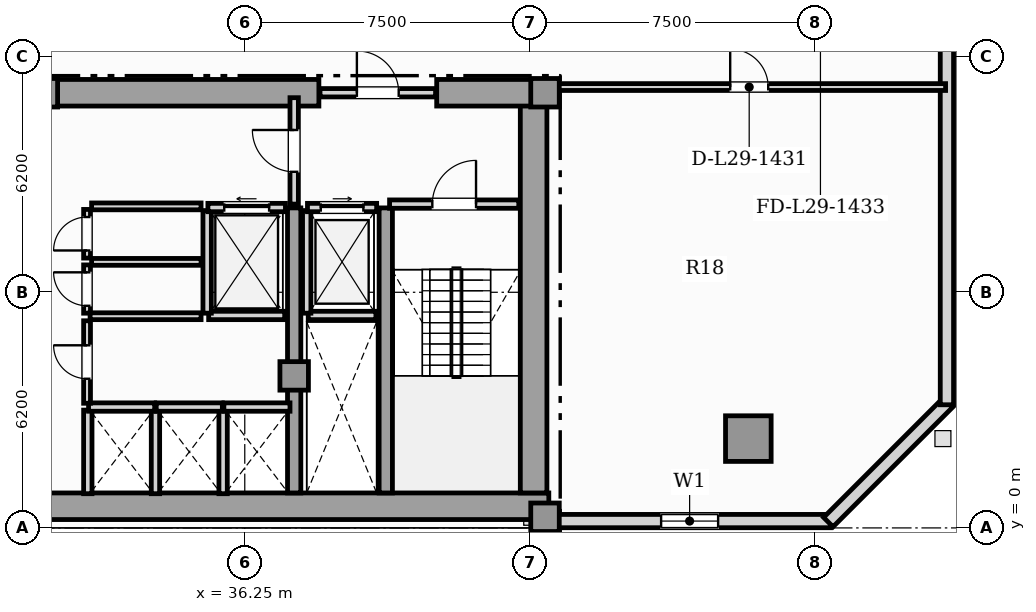
"""IFC4 building model, lengths in metres.
Left out: names, types, materials, properties, quantities, classifications, styles, units other than length and angle.
Written with IfcOpenShell. Run it as: python <this file> out.ifc"""

import sys

from ifc_helpers import new_model, si_unit, direction, frame, frame_2d, origin, origin_2d, place, context, subcontext, project, spatial, rectangle, hollow_rectangle, extrude, element, fill, save


model = new_model("IFC4")
c1 = context("Model", 3, precision=1e-05, world=origin(), true_north=direction((0.0, 1.0)))
c2 = subcontext(c1, "Body", "Model", "MODEL_VIEW")
j1 = project(units=[si_unit("LENGTHUNIT", "METRE"), si_unit("PLANEANGLEUNIT", "RADIAN")], contexts=[c1])
p1 = place(None, origin())
s1 = spatial("IfcSite", under=j1, at=p1, CompositionType="ELEMENT")
p2 = place(p1, origin())
s2 = spatial("IfcBuilding", under=s1, at=p2, CompositionType="ELEMENT")
p3 = place(p2, frame((0.0, 0.0, 119.55)))
s3 = spatial("IfcBuildingStorey", under=s2, at=p3, CompositionType="ELEMENT", Elevation=119.55)
p4 = place(p3, frame((13.25, 0.57, 0.0), z_axis=(0.0, 0.0, 1.0), x_axis=(1.0, 0.0, 0.0)))
e1 = element("IfcWall", 1, at=p4, inside=s3, PredefinedType="SHEAR", context=c2, shape_type="SweptSolid", body=[
    extrude(rectangle(XDim=31.0, YDim=0.7, at=frame_2d((15.5, 0.0))), origin(), (0.0, 0.0, 1.0), 3.6),
])
p5 = place(p3, frame((43.85, 0.92, 0.0), z_axis=(0.0, 0.0, 1.0), x_axis=(0.0, 1.0, 0.0)))
e2 = element("IfcWall", 2, at=p5, inside=s3, PredefinedType="SHEAR", context=c2, shape_type="SweptSolid", body=[
    extrude(rectangle(XDim=10.53, YDim=0.7, at=frame_2d((5.265, 0.0))), origin(), (0.0, 0.0, 1.0), 3.6),
])
p6 = place(p3, frame((30.9, 11.45, 0.0), z_axis=(0.0, 0.0, 1.0), x_axis=(1.0, 0.0, 0.0)))
e3 = element("IfcWall", 3, at=p6, inside=s3, PredefinedType="SHEAR", context=c2, shape_type="SweptSolid", body=[
    extrude(rectangle(XDim=7.3, YDim=0.7, at=frame_2d((3.65, 0.0))), origin(), (0.0, 0.0, 1.0), 3.6),
])
p7 = place(p3, frame((41.3, 11.45, 0.0), z_axis=(0.0, 0.0, 1.0), x_axis=(1.0, 0.0, 0.0)))
e4 = element("IfcWall", 4, at=p7, inside=s3, PredefinedType="SHEAR", context=c2, shape_type="SweptSolid", body=[
    extrude(rectangle(XDim=2.95, YDim=0.7, at=frame_2d((1.475, 0.0))), origin(), (0.0, 0.0, 1.0), 3.6),
])
for number, where, z_axis, x_axis in (
    (5, (37.55, 0.92, 0.0), (0.0, 0.0, 1.0), (0.0, 1.0, 0.0)),
    (6, (39.96, 0.92, 0.0), (0.0, 0.0, 1.0), (0.0, 1.0, 0.0)),
):
    element("IfcWall", number, at=place(p3, frame(where, z_axis=z_axis, x_axis=x_axis)), inside=s3, PredefinedType="SHEAR", context=c2, shape_type="SweptSolid", body=[
        extrude(rectangle(XDim=7.5, YDim=0.35, at=frame_2d((3.75, 0.0))), origin(), (0.0, 0.0, 1.0), 3.6),
    ])
for number, where, z_axis, x_axis in (
    (7, (44.15, 0.28, 0.0), (0.0, 0.0, 1.0), (1.0, 0.0, 0.0)),
    (8, (44.15, 11.45, 0.0), (0.0, 0.0, 1.0), (1.0, 0.0, 0.0)),
    (9, (37.55, 4.0, 0.0), (0.0, 0.0, 1.0), (1.0, 0.0, 0.0)),
    (10, (30.95, 11.45, 0.0), (0.0, 0.0, 1.0), (1.0, 0.0, 0.0)),
):
    element("IfcColumn", number, at=place(p3, frame(where, z_axis=z_axis, x_axis=x_axis)), inside=s3, PredefinedType="COLUMN", context=c2, shape_type="SweptSolid", body=[
        extrude(rectangle(XDim=0.75, YDim=0.75, at=origin_2d()), origin(), (0.0, 0.0, 1.0), 3.85),
    ])
p8 = place(p3, frame((49.5, 2.35, 0.0), z_axis=(0.0, 0.0, 1.0), x_axis=(1.0, 0.0, 0.0)))
e11 = element("IfcColumn", 11, at=p8, inside=s3, PredefinedType="USERDEFINED", context=c2, shape_type="SweptSolid", body=[
    extrude(hollow_rectangle(XDim=1.2, YDim=1.2, WallThickness=0.07, at=origin_2d()), origin(), (0.0, 0.0, 1.0), 3.85),
])
p9 = place(p3, frame((44.25, 0.18, 0.0), z_axis=(0.0, 0.0, 1.0), x_axis=(1.0, 0.0, 0.0)))
e12 = element("IfcWall", 12, at=p9, inside=s3, PredefinedType="SOLIDWALL", context=c2, shape_type="SweptSolid", body=[
    extrude(rectangle(XDim=7.41, YDim=0.35, at=frame_2d((3.705, 0.0))), origin(), (0.0, 0.0, 1.0), 3.6),
])
p10 = place(p9, frame((2.955, 0.0, 0.9)))
e13 = element("IfcOpeningElement", 13, at=p10, cuts=e12, PredefinedType="OPENING", context=c2, shape_type="SweptSolid", body=[
    extrude(rectangle(XDim=1.5, YDim=1.95, at=frame_2d((0.75, 0.975))), frame((0.0, 0.185, 0.0), z_axis=(0.0, -1.0, 0.0), x_axis=(1.0, 0.0, 0.0)), (0.0, 0.0, 1.0), 0.37),
])
p11 = place(p3, frame((51.604, 0.152, 0.0), z_axis=(0.0, 0.0, 1.0), x_axis=(0.707134240044, 0.707079321262, 0.0)))
e14 = element("IfcWall", 14, at=p11, inside=s3, PredefinedType="SOLIDWALL", context=c2, shape_type="SweptSolid", body=[
    extrude(rectangle(XDim=4.446, YDim=0.35, at=frame_2d((2.223, 0.0))), origin(), (0.0, 0.0, 1.0), 3.6),
])
p12 = place(p3, frame((54.725, 3.24, 0.0), z_axis=(0.0, 0.0, 1.0), x_axis=(0.0, 1.0, 0.0)))
e15 = element("IfcWall", 15, at=p12, inside=s3, PredefinedType="SOLIDWALL", context=c2, shape_type="SweptSolid", body=[
    extrude(rectangle(XDim=18.37, YDim=0.35, at=frame_2d((9.185, 0.0))), origin(), (0.0, 0.0, 1.0), 3.6),
])
p13 = place(p12, frame((12.762, 0.0, 0.9)))
e16 = element("IfcOpeningElement", 16, at=p13, cuts=e15, PredefinedType="OPENING", context=c2, shape_type="SweptSolid", body=[
    extrude(rectangle(XDim=1.5, YDim=1.95, at=frame_2d((0.75, 0.975))), frame((0.0, 0.185, 0.0), z_axis=(0.0, -1.0, 0.0), x_axis=(1.0, 0.0, 0.0)), (0.0, 0.0, 1.0), 0.37),
])
p14 = place(p3, frame((37.92, 5.59, 0.0), z_axis=(0.0, 0.0, 1.0), x_axis=(1.0, 0.0, 0.0)))
e17 = element("IfcWall", 17, at=p14, inside=s3, PredefinedType="SOLIDWALL", context=c2, shape_type="SweptSolid", body=[
    extrude(rectangle(XDim=1.78, YDim=0.22, at=frame_2d((0.89, 0.0))), origin(), (0.0, 0.0, 1.0), 3.6),
])
p15 = place(p3, frame((37.88, 5.65, 0.0), z_axis=(0.0, 0.0, 1.0), x_axis=(0.0, 1.0, 0.0)))
e18 = element("IfcWall", 18, at=p15, inside=s3, PredefinedType="SOLIDWALL", context=c2, shape_type="SweptSolid", body=[
    extrude(rectangle(XDim=2.7, YDim=0.22, at=frame_2d((1.35, 0.0))), origin(), (0.0, 0.0, 1.0), 3.6),
])
p16 = place(p3, frame((37.9, 8.43, 0.0), z_axis=(0.0, 0.0, 1.0), x_axis=(1.0, 0.0, 0.0)))
e19 = element("IfcWall", 19, at=p16, inside=s3, PredefinedType="SOLIDWALL", context=c2, shape_type="SweptSolid", body=[
    extrude(rectangle(XDim=1.82, YDim=0.22, at=frame_2d((0.91, 0.0))), origin(), (0.0, 0.0, 1.0), 3.6),
])
p17 = place(p16, frame((0.35, 0.0, 0.0)))
e20 = element("IfcOpeningElement", 20, at=p17, cuts=e19, PredefinedType="OPENING", context=c2, shape_type="SweptSolid", body=[
    extrude(rectangle(XDim=1.12, YDim=2.25, at=frame_2d((0.56, 1.125))), frame((0.0, 0.12, 0.0), z_axis=(0.0, -1.0, 0.0), x_axis=(1.0, 0.0, 0.0)), (0.0, 0.0, 1.0), 0.24),
])
p18 = place(p3, frame((35.3, 5.59, 0.0), z_axis=(0.0, 0.0, 1.0), x_axis=(1.0, 0.0, 0.0)))
e21 = element("IfcWall", 21, at=p18, inside=s3, PredefinedType="SOLIDWALL", context=c2, shape_type="SweptSolid", body=[
    extrude(rectangle(XDim=2.0, YDim=0.22, at=frame_2d((1.0, 0.0))), origin(), (0.0, 0.0, 1.0), 3.6),
])
p19 = place(p3, frame((35.26, 5.65, 0.0), z_axis=(0.0, 0.0, 1.0), x_axis=(0.0, 1.0, 0.0)))
e22 = element("IfcWall", 22, at=p19, inside=s3, PredefinedType="SOLIDWALL", context=c2, shape_type="SweptSolid", body=[
    extrude(rectangle(XDim=2.7, YDim=0.22, at=frame_2d((1.35, 0.0))), origin(), (0.0, 0.0, 1.0), 3.6),
])
p20 = place(p3, frame((35.28, 8.43, 0.0), z_axis=(0.0, 0.0, 1.0), x_axis=(1.0, 0.0, 0.0)))
e23 = element("IfcWall", 23, at=p20, inside=s3, PredefinedType="SOLIDWALL", context=c2, shape_type="SweptSolid", body=[
    extrude(rectangle(XDim=2.04, YDim=0.22, at=frame_2d((1.02, 0.0))), origin(), (0.0, 0.0, 1.0), 3.6),
])
p21 = place(p20, frame((0.43, 0.0, 0.0)))
e24 = element("IfcOpeningElement", 24, at=p21, cuts=e23, PredefinedType="OPENING", context=c2, shape_type="SweptSolid", body=[
    extrude(rectangle(XDim=1.18, YDim=2.2, at=frame_2d((0.59, 1.1))), frame((0.0, 0.12, 0.0), z_axis=(0.0, -1.0, 0.0), x_axis=(1.0, 0.0, 0.0)), (0.0, 0.0, 1.0), 0.24),
])
for number, where, z_axis, x_axis in (
    (25, (32.12, 0.9, 0.0), (0.0, 0.0, 1.0), (0.0, 1.0, 0.0)),
    (26, (33.9, 0.9, 0.0), (0.0, 0.0, 1.0), (0.0, 1.0, 0.0)),
):
    element("IfcWall", number, at=place(p3, frame(where, z_axis=z_axis, x_axis=x_axis)), inside=s3, PredefinedType="SOLIDWALL", context=c2, shape_type="SweptSolid", body=[
        extrude(rectangle(XDim=2.2, YDim=0.22, at=frame_2d((1.1, 0.0))), origin(), (0.0, 0.0, 1.0), 3.6),
    ])
p22 = place(p3, frame((32.14, 3.18, 0.0), z_axis=(0.0, 0.0, 1.0), x_axis=(1.0, 0.0, 0.0)))
e27 = element("IfcWall", 27, at=p22, inside=s3, PredefinedType="SOLIDWALL", context=c2, shape_type="SweptSolid", body=[
    extrude(rectangle(XDim=1.74, YDim=0.22, at=frame_2d((0.87, 0.0))), origin(), (0.0, 0.0, 1.0), 3.6),
])
p23 = place(p3, frame((35.68, 0.9, 0.0), z_axis=(0.0, 0.0, 1.0), x_axis=(0.0, 1.0, 0.0)))
e28 = element("IfcWall", 28, at=p23, inside=s3, PredefinedType="SOLIDWALL", context=c2, shape_type="SweptSolid", body=[
    extrude(rectangle(XDim=2.2, YDim=0.22, at=frame_2d((1.1, 0.0))), origin(), (0.0, 0.0, 1.0), 3.6),
])
for number, where, z_axis, x_axis in (
    (29, (33.92, 3.18, 0.0), (0.0, 0.0, 1.0), (1.0, 0.0, 0.0)),
    (30, (35.7, 3.18, 0.0), (0.0, 0.0, 1.0), (1.0, 0.0, 0.0)),
):
    element("IfcWall", number, at=place(p3, frame(where, z_axis=z_axis, x_axis=x_axis)), inside=s3, PredefinedType="SOLIDWALL", context=c2, shape_type="SweptSolid", body=[
        extrude(rectangle(XDim=1.74, YDim=0.22, at=frame_2d((0.87, 0.0))), origin(), (0.0, 0.0, 1.0), 3.6),
    ])
p24 = place(p3, frame((40.06, 8.52, 0.0), z_axis=(0.0, 0.0, 1.0), x_axis=(1.0, 0.0, 0.0)))
e31 = element("IfcWall", 31, at=p24, inside=s3, PredefinedType="SOLIDWALL", context=c2, shape_type="SweptSolid", body=[
    extrude(rectangle(XDim=3.4, YDim=0.22, at=frame_2d((1.7, 0.0))), origin(), (0.0, 0.0, 1.0), 3.6),
])
p25 = place(p24, frame((1.125, 0.0, 0.0)))
e32 = element("IfcOpeningElement", 32, at=p25, cuts=e31, PredefinedType="OPENING", context=c2, shape_type="SweptSolid", body=[
    extrude(rectangle(XDim=1.15, YDim=2.2, at=frame_2d((0.575, 1.1))), frame((0.0, 0.12, 0.0), z_axis=(0.0, -1.0, 0.0), x_axis=(1.0, 0.0, 0.0)), (0.0, 0.0, 1.0), 0.24),
])
p26 = place(p3, frame((37.55, 8.52, 0.0), z_axis=(0.0, 0.0, 1.0), x_axis=(0.0, 1.0, 0.0)))
e33 = element("IfcWall", 33, at=p26, inside=s3, PredefinedType="SOLIDWALL", context=c2, shape_type="SweptSolid", body=[
    extrude(rectangle(XDim=2.8, YDim=0.22, at=frame_2d((1.4, 0.0))), origin(), (0.0, 0.0, 1.0), 3.055),
])
p27 = place(p26, frame((0.85, 0.0, 0.0)))
e34 = element("IfcOpeningElement", 34, at=p27, cuts=e33, PredefinedType="OPENING", context=c2, shape_type="SweptSolid", body=[
    extrude(rectangle(XDim=1.1, YDim=2.2, at=frame_2d((0.55, 1.1))), frame((0.0, 0.12, 0.0), z_axis=(0.0, -1.0, 0.0), x_axis=(1.0, 0.0, 0.0)), (0.0, 0.0, 1.0), 0.24),
])
p28 = place(p3, frame((38.23, 11.45, 0.0), z_axis=(0.0, 0.0, 1.0), x_axis=(1.0, 0.0, 0.0)))
e35 = element("IfcWall", 35, at=p28, inside=s3, PredefinedType="SOLIDWALL", context=c2, shape_type="SweptSolid", body=[
    extrude(rectangle(XDim=3.04, YDim=0.22, at=frame_2d((1.52, 0.0))), origin(), (0.0, 0.0, 1.0), 3.6),
])
p29 = place(p28, frame((0.97, 0.0, 0.0)))
e36 = element("IfcOpeningElement", 36, at=p29, cuts=e35, PredefinedType="OPENING", context=c2, shape_type="SweptSolid", body=[
    extrude(rectangle(XDim=1.1, YDim=2.2, at=frame_2d((0.55, 1.1))), frame((0.0, 0.12, 0.0), z_axis=(0.0, -1.0, 0.0), x_axis=(1.0, 0.0, 0.0)), (0.0, 0.0, 1.0), 0.24),
])
p30 = place(p3, frame((32.1, 5.65, 0.0), z_axis=(0.0, 0.0, 1.0), x_axis=(0.0, 1.0, 0.0)))
e37 = element("IfcWall", 37, at=p30, inside=s3, PredefinedType="PARTITIONING", context=c2, shape_type="SweptSolid", body=[
    extrude(rectangle(XDim=1.27, YDim=0.18, at=frame_2d((0.635, 0.0))), origin(), (0.0, 0.0, 1.0), 3.6),
])
p31 = place(p30, frame((0.195, 0.0, 0.0)))
e38 = element("IfcOpeningElement", 38, at=p31, cuts=e37, PredefinedType="OPENING", context=c2, shape_type="SweptSolid", body=[
    extrude(rectangle(XDim=0.88, YDim=2.05, at=frame_2d((0.44, 1.025))), frame((0.0, 0.1, 0.0), z_axis=(0.0, -1.0, 0.0), x_axis=(1.0, 0.0, 0.0)), (0.0, 0.0, 1.0), 0.2),
])
p32 = place(p3, frame((32.22, 7.0, 0.0), z_axis=(0.0, 0.0, 1.0), x_axis=(1.0, 0.0, 0.0)))
e39 = element("IfcWall", 39, at=p32, inside=s3, PredefinedType="PARTITIONING", context=c2, shape_type="SweptSolid", body=[
    extrude(rectangle(XDim=2.88, YDim=0.18, at=frame_2d((1.44, 0.0))), origin(), (0.0, 0.0, 1.0), 3.6),
])
p33 = place(p3, frame((32.18, 5.57, 0.0), z_axis=(0.0, 0.0, 1.0), x_axis=(1.0, 0.0, 0.0)))
e40 = element("IfcWall", 40, at=p33, inside=s3, PredefinedType="PARTITIONING", context=c2, shape_type="SweptSolid", body=[
    extrude(rectangle(XDim=2.92, YDim=0.18, at=frame_2d((1.46, 0.0))), origin(), (0.0, 0.0, 1.0), 3.6),
])
p34 = place(p3, frame((32.1, 7.1, 0.0), z_axis=(0.0, 0.0, 1.0), x_axis=(0.0, 1.0, 0.0)))
e41 = element("IfcWall", 41, at=p34, inside=s3, PredefinedType="PARTITIONING", context=c2, shape_type="SweptSolid", body=[
    extrude(rectangle(XDim=1.28, YDim=0.18, at=frame_2d((0.64, 0.0))), origin(), (0.0, 0.0, 1.0), 3.6),
])
p35 = place(p34, frame((0.2, 0.0, 0.0)))
e42 = element("IfcOpeningElement", 42, at=p35, cuts=e41, PredefinedType="OPENING", context=c2, shape_type="SweptSolid", body=[
    extrude(rectangle(XDim=0.88, YDim=2.05, at=frame_2d((0.44, 1.025))), frame((0.0, 0.1, 0.0), z_axis=(0.0, -1.0, 0.0), x_axis=(1.0, 0.0, 0.0)), (0.0, 0.0, 1.0), 0.2),
])
p36 = place(p3, frame((32.22, 8.46, 0.0), z_axis=(0.0, 0.0, 1.0), x_axis=(1.0, 0.0, 0.0)))
e43 = element("IfcWall", 43, at=p36, inside=s3, PredefinedType="PARTITIONING", context=c2, shape_type="SweptSolid", body=[
    extrude(rectangle(XDim=2.88, YDim=0.18, at=frame_2d((1.44, 0.0))), origin(), (0.0, 0.0, 1.0), 3.6),
])
p37 = place(p3, frame((32.1, 3.28, 0.0), z_axis=(0.0, 0.0, 1.0), x_axis=(0.0, 1.0, 0.0)))
e44 = element("IfcWall", 44, at=p37, inside=s3, PredefinedType="PARTITIONING", context=c2, shape_type="SweptSolid", body=[
    extrude(rectangle(XDim=2.17, YDim=0.18, at=frame_2d((1.085, 0.0))), origin(), (0.0, 0.0, 1.0), 3.6),
])
p38 = place(p37, frame((0.645, 0.0, 0.0)))
e45 = element("IfcOpeningElement", 45, at=p38, cuts=e44, PredefinedType="OPENING", context=c2, shape_type="SweptSolid", body=[
    extrude(rectangle(XDim=0.88, YDim=2.05, at=frame_2d((0.44, 1.025))), frame((0.0, 0.1, 0.0), z_axis=(0.0, -1.0, 0.0), x_axis=(1.0, 0.0, 0.0)), (0.0, 0.0, 1.0), 0.2),
])
p39 = place(p3, frame((44.355, 11.6, 0.0), z_axis=(0.0, 0.0, 1.0), x_axis=(1.0, 0.0, 0.0)))
e46 = element("IfcWall", 46, at=p39, inside=s3, PredefinedType="PARTITIONING", context=c2, shape_type="SweptSolid", body=[
    extrude(rectangle(XDim=10.335, YDim=0.18, at=frame_2d((5.167, 0.0))), origin(), (0.0, 0.0, 1.0), 3.6),
])
p40 = place(p39, frame((4.667, 0.0, 0.0)))
e47 = element("IfcOpeningElement", 47, at=p40, cuts=e46, PredefinedType="OPENING", context=c2, shape_type="SweptSolid", body=[
    extrude(rectangle(XDim=1.0, YDim=2.15, at=frame_2d((0.5, 1.075))), frame((0.0, 0.1, 0.0), z_axis=(0.0, -1.0, 0.0), x_axis=(1.0, 0.0, 0.0)), (0.0, 0.0, 1.0), 0.2),
])
p41 = place(p10, origin())
e48 = element("IfcWindow", 48, at=p41, inside=s3, PartitioningType="SINGLE_PANEL", PredefinedType="WINDOW", context=c2, shape_type="SweptSolid", body=[
    extrude(rectangle(XDim=1.5, YDim=1.95, at=frame_2d((0.75, 0.975))), frame((0.0, 0.03, 0.0), z_axis=(0.0, -1.0, 0.0), x_axis=(1.0, 0.0, 0.0)), (0.0, 0.0, 1.0), 0.06),
])
fill(e13, e48)
p42 = place(p17, origin())
e49 = element("IfcDoor", 49, at=p42, inside=s3, OperationType="SLIDING_TO_RIGHT", PredefinedType="DOOR", context=c2, shape_type="SweptSolid", body=[
    extrude(rectangle(XDim=1.12, YDim=2.25, at=frame_2d((0.56, 1.125))), frame((0.0, 0.025, 0.0), z_axis=(0.0, -1.0, 0.0), x_axis=(1.0, 0.0, 0.0)), (0.0, 0.0, 1.0), 0.05),
])
fill(e20, e49)
p43 = place(p21, origin())
e50 = element("IfcDoor", 50, at=p43, inside=s3, OperationType="SLIDING_TO_LEFT", PredefinedType="DOOR", context=c2, shape_type="SweptSolid", body=[
    extrude(rectangle(XDim=1.18, YDim=2.2, at=frame_2d((0.59, 1.1))), frame((0.0, 0.025, 0.0), z_axis=(0.0, -1.0, 0.0), x_axis=(1.0, 0.0, 0.0)), (0.0, 0.0, 1.0), 0.05),
])
fill(e24, e50)
p44 = place(p25, origin())
e51 = element("IfcDoor", 51, at=p44, inside=s3, OperationType="SINGLE_SWING_RIGHT", PredefinedType="DOOR", context=c2, shape_type="SweptSolid", body=[
    extrude(rectangle(XDim=1.15, YDim=2.2, at=frame_2d((0.575, 1.1))), frame((0.0, 0.025, 0.0), z_axis=(0.0, -1.0, 0.0), x_axis=(1.0, 0.0, 0.0)), (0.0, 0.0, 1.0), 0.05),
])
fill(e32, e51)
p45 = place(p27, origin())
e52 = element("IfcDoor", 52, at=p45, inside=s3, OperationType="SINGLE_SWING_RIGHT", PredefinedType="DOOR", context=c2, shape_type="SweptSolid", body=[
    extrude(rectangle(XDim=1.1, YDim=2.2, at=frame_2d((0.55, 1.1))), frame((0.0, 0.025, 0.0), z_axis=(0.0, -1.0, 0.0), x_axis=(1.0, 0.0, 0.0)), (0.0, 0.0, 1.0), 0.05),
])
fill(e34, e52)
p46 = place(p29, origin())
e53 = element("IfcDoor", 53, at=p46, inside=s3, OperationType="SINGLE_SWING_LEFT", PredefinedType="DOOR", context=c2, shape_type="SweptSolid", body=[
    extrude(rectangle(XDim=1.1, YDim=2.2, at=frame_2d((0.55, 1.1))), frame((0.0, 0.025, 0.0), z_axis=(0.0, -1.0, 0.0), x_axis=(1.0, 0.0, 0.0)), (0.0, 0.0, 1.0), 0.05),
])
fill(e36, e53)
p47 = place(p31, origin())
e54 = element("IfcDoor", 54, at=p47, inside=s3, OperationType="SINGLE_SWING_RIGHT", PredefinedType="DOOR", context=c2, shape_type="SweptSolid", body=[
    extrude(rectangle(XDim=0.88, YDim=2.05, at=frame_2d((0.44, 1.025))), frame((0.0, 0.025, 0.0), z_axis=(0.0, -1.0, 0.0), x_axis=(1.0, 0.0, 0.0)), (0.0, 0.0, 1.0), 0.05),
])
fill(e38, e54)
p48 = place(p35, origin())
e55 = element("IfcDoor", 55, at=p48, inside=s3, OperationType="SINGLE_SWING_LEFT", PredefinedType="DOOR", context=c2, shape_type="SweptSolid", body=[
    extrude(rectangle(XDim=0.88, YDim=2.05, at=frame_2d((0.44, 1.025))), frame((0.0, 0.025, 0.0), z_axis=(0.0, -1.0, 0.0), x_axis=(1.0, 0.0, 0.0)), (0.0, 0.0, 1.0), 0.05),
])
fill(e42, e55)
p49 = place(p38, origin())
e56 = element("IfcDoor", 56, at=p49, inside=s3, OperationType="SINGLE_SWING_RIGHT", PredefinedType="DOOR", context=c2, shape_type="SweptSolid", body=[
    extrude(rectangle(XDim=0.88, YDim=2.05, at=frame_2d((0.44, 1.025))), frame((0.0, 0.025, 0.0), z_axis=(0.0, -1.0, 0.0), x_axis=(1.0, 0.0, 0.0)), (0.0, 0.0, 1.0), 0.05),
])
fill(e45, e56)
p50 = place(p40, origin())
e57 = element("IfcDoor", 57, at=p50, inside=s3, OperationType="SINGLE_SWING_LEFT", PredefinedType="DOOR", context=c2, shape_type="SweptSolid", body=[
    extrude(rectangle(XDim=1.0, YDim=2.15, at=frame_2d((0.5, 1.075))), frame((0.0, 0.025, 0.0), z_axis=(0.0, -1.0, 0.0), x_axis=(1.0, 0.0, 0.0)), (0.0, 0.0, 1.0), 0.05),
])
fill(e47, e57)
save(model, sys.argv[1])
